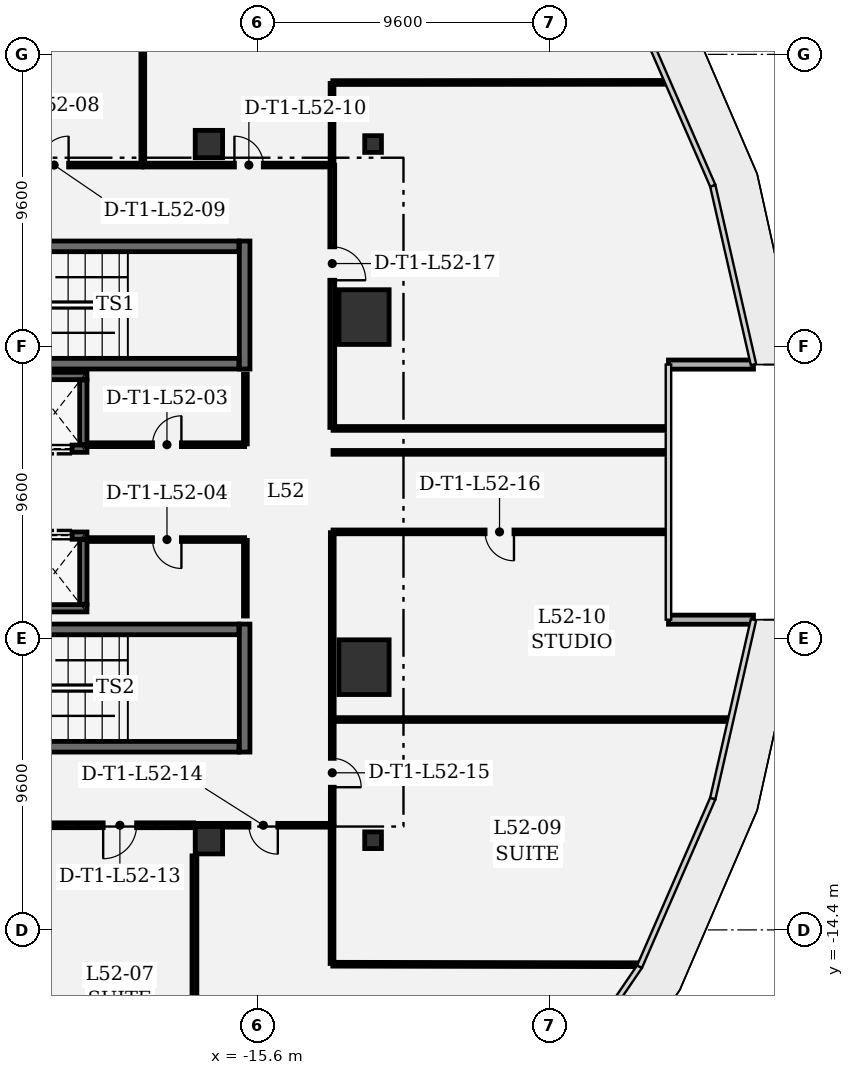
"""IFC4 building model, lengths in metres.
Left out: names, types, materials, properties, quantities, classifications, styles, units other than length and angle.
Written with IfcOpenShell. Run it as: python <this file> out.ifc"""

import sys

from ifc_helpers import new_model, si_unit, direction, frame, frame_2d, origin, origin_2d, place, context, subcontext, project, spatial, rectangle, extrude, element, fill, save


model = new_model("IFC4")
c1 = context("Model", 3, precision=1e-05, world=origin(), true_north=direction((0.0, 1.0)))
c2 = subcontext(c1, "Body", "Model", "MODEL_VIEW")
j1 = project(units=[si_unit("LENGTHUNIT", "METRE"), si_unit("PLANEANGLEUNIT", "RADIAN")], contexts=[c1])
p1 = place(None, origin())
s1 = spatial("IfcSite", under=j1, at=p1, CompositionType="ELEMENT")
p2 = place(p1, origin())
s2 = spatial("IfcBuilding", under=s1, at=p2, CompositionType="ELEMENT")
p3 = place(p2, frame((0.0, 0.0, 225.3)))
s3 = spatial("IfcBuildingStorey", under=s2, at=p3, CompositionType="ELEMENT", Elevation=225.3)
for number, where, z_axis, x_axis in (
    (1, (-12.097, -5.758, 0.0), (0.0, 0.0, 1.0), (1.0, 0.0, 0.0)),
    (2, (-12.097, 5.758, 0.0), (0.0, 0.0, 1.0), (1.0, 0.0, 0.0)),
):
    element("IfcColumn", number, at=place(p3, frame(where, z_axis=z_axis, x_axis=x_axis)), inside=s3, PredefinedType="COLUMN", context=c2, shape_type="SweptSolid", body=[
        extrude(rectangle(XDim=1.65, YDim=1.8, at=origin_2d()), origin(), (0.0, 0.0, 1.0), 4.05),
    ])
for number, where, z_axis, x_axis in (
    (3, (-17.2, 11.45, 0.0), (0.0, 0.0, 1.0), (1.0, 0.0, 0.0)),
    (4, (-17.2, -11.45, 0.0), (0.0, 0.0, 1.0), (1.0, 0.0, 0.0)),
):
    element("IfcColumn", number, at=place(p3, frame(where, z_axis=z_axis, x_axis=x_axis)), inside=s3, PredefinedType="COLUMN", context=c2, shape_type="SweptSolid", body=[
        extrude(rectangle(XDim=0.9, YDim=0.9, at=origin_2d()), origin(), (0.0, 0.0, 1.0), 4.05),
    ])
for number, where, z_axis, x_axis in (
    (5, (-11.8, -11.45, 0.0), (0.0, 0.0, 1.0), (1.0, 0.0, 0.0)),
    (6, (-11.8, 11.45, 0.0), (0.0, 0.0, 1.0), (1.0, 0.0, 0.0)),
):
    element("IfcColumn", number, at=place(p3, frame(where, z_axis=z_axis, x_axis=x_axis)), inside=s3, PredefinedType="COLUMN", context=c2, shape_type="SweptSolid", body=[
        extrude(rectangle(XDim=0.55, YDim=0.55, at=origin_2d()), origin(), (0.0, 0.0, 1.0), 4.05),
    ])
for number, where, z_axis, x_axis in (
    (7, (0.713, -4.196, 0.0), (0.0, 0.0, 1.0), (-1.0, 0.0, 0.0)),
    (8, (-2.084, 4.196, 0.0), (0.0, 0.0, 1.0), (1.0, 0.0, 0.0)),
):
    element("IfcWall", number, at=place(p3, frame(where, z_axis=z_axis, x_axis=x_axis)), inside=s3, PredefinedType="SOLIDWALL", context=c2, shape_type="SweptSolid", body=[
        extrude(rectangle(XDim=2.797, YDim=0.3, at=frame_2d((1.398, 0.0))), origin(), (0.0, 0.0, 1.0), 3.78),
    ])
p4 = place(p3, frame((-16.025, 4.05, 0.0), z_axis=(0.0, 0.0, 1.0), x_axis=(0.0, 1.0, 0.0)))
e9 = element("IfcWall", 9, at=p4, inside=s3, PredefinedType="SHEAR", context=c2, shape_type="SweptSolid", body=[
    extrude(rectangle(XDim=4.21, YDim=0.35, at=frame_2d((2.105, 0.0))), origin(), (0.0, 0.0, 1.0), 3.78),
])
p5 = place(p3, frame((-24.335, 4.225, 0.0), z_axis=(0.0, 0.0, 1.0), x_axis=(1.0, 0.0, 0.0)))
e10 = element("IfcWall", 10, at=p5, inside=s3, PredefinedType="SHEAR", context=c2, shape_type="SweptSolid", body=[
    extrude(rectangle(XDim=8.12, YDim=0.35, at=frame_2d((4.06, 0.0))), origin(), (0.0, 0.0, 1.0), 3.78),
])
p6 = place(p3, frame((-16.215, 8.085, 0.0), z_axis=(0.0, 0.0, 1.0), x_axis=(-1.0, 0.0, 0.0)))
e11 = element("IfcWall", 11, at=p6, inside=s3, PredefinedType="SHEAR", context=c2, shape_type="SweptSolid", body=[
    extrude(rectangle(XDim=8.12, YDim=0.35, at=frame_2d((4.06, 0.0))), origin(), (0.0, 0.0, 1.0), 3.78),
])
p7 = place(p6, frame((6.74, 0.0, 0.0)))
e12 = element("IfcOpeningElement", 12, at=p7, cuts=e11, PredefinedType="OPENING", context=c2, shape_type="SweptSolid", body=[
    extrude(rectangle(XDim=1.1, YDim=2.2, at=frame_2d((0.55, 1.1))), frame((0.0, 0.185, 0.0), z_axis=(0.0, -1.0, 0.0), x_axis=(1.0, 0.0, 0.0)), (0.0, 0.0, 1.0), 0.37),
])
p8 = place(p3, frame((-16.025, -8.55, 0.0), z_axis=(0.0, 0.0, 1.0), x_axis=(0.0, 1.0, 0.0)))
e13 = element("IfcWall", 13, at=p8, inside=s3, PredefinedType="SHEAR", context=c2, shape_type="SweptSolid", body=[
    extrude(rectangle(XDim=4.21, YDim=0.35, at=frame_2d((2.105, 0.0))), origin(), (0.0, 0.0, 1.0), 3.78),
])
p9 = place(p3, frame((-24.335, -8.375, 0.0), z_axis=(0.0, 0.0, 1.0), x_axis=(1.0, 0.0, 0.0)))
e14 = element("IfcWall", 14, at=p9, inside=s3, PredefinedType="SHEAR", context=c2, shape_type="SweptSolid", body=[
    extrude(rectangle(XDim=8.12, YDim=0.35, at=frame_2d((4.06, 0.0))), origin(), (0.0, 0.0, 1.0), 3.78),
])
p10 = place(p9, frame((0.28, 0.0, 0.0)))
e15 = element("IfcOpeningElement", 15, at=p10, cuts=e14, PredefinedType="OPENING", context=c2, shape_type="SweptSolid", body=[
    extrude(rectangle(XDim=1.1, YDim=2.2, at=frame_2d((0.55, 1.1))), frame((0.0, 0.185, 0.0), z_axis=(0.0, -1.0, 0.0), x_axis=(1.0, 0.0, 0.0)), (0.0, 0.0, 1.0), 0.37),
])
p11 = place(p3, frame((-16.215, -4.515, 0.0), z_axis=(0.0, 0.0, 1.0), x_axis=(-1.0, 0.0, 0.0)))
e16 = element("IfcWall", 16, at=p11, inside=s3, PredefinedType="SHEAR", context=c2, shape_type="SweptSolid", body=[
    extrude(rectangle(XDim=8.12, YDim=0.35, at=frame_2d((4.06, 0.0))), origin(), (0.0, 0.0, 1.0), 3.78),
])
p12 = place(p3, frame((-21.21, 1.43, 0.0), z_axis=(0.0, 0.0, 1.0), x_axis=(-1.0, 0.0, 0.0)))
e17 = element("IfcWall", 17, at=p12, inside=s3, PredefinedType="SHEAR", context=c2, shape_type="SweptSolid", body=[
    extrude(rectangle(XDim=2.08, YDim=0.24, at=frame_2d((1.04, 0.0))), origin(), (0.0, 0.0, 1.0), 3.78),
])
p13 = place(p12, frame((0.49, 0.0, 0.0)))
e18 = element("IfcOpeningElement", 18, at=p13, cuts=e17, PredefinedType="OPENING", context=c2, shape_type="SweptSolid", body=[
    extrude(rectangle(XDim=1.1, YDim=2.2, at=frame_2d((0.55, 1.1))), frame((0.0, 0.13, 0.0), z_axis=(0.0, -1.0, 0.0), x_axis=(1.0, 0.0, 0.0)), (0.0, 0.0, 1.0), 0.26),
])
p14 = place(p3, frame((-23.29, 3.82, 0.0), z_axis=(0.0, 0.0, 1.0), x_axis=(1.0, 0.0, 0.0)))
e19 = element("IfcWall", 19, at=p14, inside=s3, PredefinedType="SHEAR", context=c2, shape_type="SweptSolid", body=[
    extrude(rectangle(XDim=2.08, YDim=0.24, at=frame_2d((1.04, 0.0))), origin(), (0.0, 0.0, 1.0), 3.78),
])
p15 = place(p3, frame((-21.33, 3.688, 0.0), z_axis=(0.0, 0.0, 1.0), x_axis=(0.0, -1.0, 0.0)))
e20 = element("IfcWall", 20, at=p15, inside=s3, PredefinedType="SHEAR", context=c2, shape_type="SweptSolid", body=[
    extrude(rectangle(XDim=2.126, YDim=0.24, at=frame_2d((1.063, 0.0))), origin(), (0.0, 0.0, 1.0), 3.78),
])
p16 = place(p3, frame((-21.21, -3.82, 0.0), z_axis=(0.0, 0.0, 1.0), x_axis=(-1.0, 0.0, 0.0)))
e21 = element("IfcWall", 21, at=p16, inside=s3, PredefinedType="SHEAR", context=c2, shape_type="SweptSolid", body=[
    extrude(rectangle(XDim=1.8, YDim=0.24, at=frame_2d((0.9, 0.0))), origin(), (0.0, 0.0, 1.0), 3.78),
])
p17 = place(p3, frame((-23.01, -1.43, 0.0), z_axis=(0.0, 0.0, 1.0), x_axis=(1.0, 0.0, 0.0)))
e22 = element("IfcWall", 22, at=p17, inside=s3, PredefinedType="SHEAR", context=c2, shape_type="SweptSolid", body=[
    extrude(rectangle(XDim=1.8, YDim=0.24, at=frame_2d((0.9, 0.0))), origin(), (0.0, 0.0, 1.0), 3.78),
])
p18 = place(p17, frame((0.21, 0.0, 0.0)))
e23 = element("IfcOpeningElement", 23, at=p18, cuts=e22, PredefinedType="OPENING", context=c2, shape_type="SweptSolid", body=[
    extrude(rectangle(XDim=1.1, YDim=2.2, at=frame_2d((0.55, 1.1))), frame((0.0, 0.13, 0.0), z_axis=(0.0, -1.0, 0.0), x_axis=(1.0, 0.0, 0.0)), (0.0, 0.0, 1.0), 0.26),
])
p19 = place(p3, frame((-21.33, -1.562, 0.0), z_axis=(0.0, 0.0, 1.0), x_axis=(0.0, -1.0, 0.0)))
e24 = element("IfcWall", 24, at=p19, inside=s3, PredefinedType="SHEAR", context=c2, shape_type="SweptSolid", body=[
    extrude(rectangle(XDim=2.126, YDim=0.24, at=frame_2d((1.063, 0.0))), origin(), (0.0, 0.0, 1.0), 3.78),
])
p20 = place(p3, frame((-21.134, 1.56, 0.0), z_axis=(0.0, 0.0, 1.0), x_axis=(1.0, 0.0, 0.0)))
e25 = element("IfcWall", 25, at=p20, inside=s3, PredefinedType="PARTITIONING", context=c2, shape_type="SweptSolid", body=[
    extrude(rectangle(XDim=5.109, YDim=0.125, at=frame_2d((2.554, 0.0))), origin(), (0.0, 0.0, 1.0), 3.78),
])
p21 = place(p20, frame((2.079, 0.0, 0.0)))
e26 = element("IfcOpeningElement", 26, at=p21, cuts=e25, PredefinedType="OPENING", context=c2, shape_type="SweptSolid", body=[
    extrude(rectangle(XDim=0.95, YDim=2.15, at=frame_2d((0.475, 1.075))), frame((0.0, 0.073, 0.0), z_axis=(0.0, -1.0, 0.0), x_axis=(1.0, 0.0, 0.0)), (0.0, 0.0, 1.0), 0.145),
])
p22 = place(p3, frame((-16.0, 1.585, 0.0), z_axis=(0.0, 0.0, 1.0), x_axis=(0.0, 1.0, 0.0)))
e27 = element("IfcWall", 27, at=p22, inside=s3, PredefinedType="PARTITIONING", context=c2, shape_type="SweptSolid", body=[
    extrude(rectangle(XDim=2.302, YDim=0.125, at=frame_2d((1.151, 0.0))), origin(), (0.0, 0.0, 1.0), 3.78),
])
p23 = place(p3, frame((-16.0, -4.075, 0.0), z_axis=(0.0, 0.0, 1.0), x_axis=(0.0, 1.0, 0.0)))
e28 = element("IfcWall", 28, at=p23, inside=s3, PredefinedType="PARTITIONING", context=c2, shape_type="SweptSolid", body=[
    extrude(rectangle(XDim=2.49, YDim=0.125, at=frame_2d((1.245, 0.0))), origin(), (0.0, 0.0, 1.0), 3.78),
])
p24 = place(p3, frame((-16.025, -1.56, 0.0), z_axis=(0.0, 0.0, 1.0), x_axis=(-1.0, 0.0, 0.0)))
e29 = element("IfcWall", 29, at=p24, inside=s3, PredefinedType="PARTITIONING", context=c2, shape_type="SweptSolid", body=[
    extrude(rectangle(XDim=5.109, YDim=0.125, at=frame_2d((2.554, 0.0))), origin(), (0.0, 0.0, 1.0), 3.78),
])
p25 = place(p24, frame((2.079, 0.0, 0.0)))
e30 = element("IfcOpeningElement", 30, at=p25, cuts=e29, PredefinedType="OPENING", context=c2, shape_type="SweptSolid", body=[
    extrude(rectangle(XDim=0.95, YDim=2.15, at=frame_2d((0.475, 1.075))), frame((0.0, 0.073, 0.0), z_axis=(0.0, -1.0, 0.0), x_axis=(1.0, 0.0, 0.0)), (0.0, 0.0, 1.0), 0.145),
])
p26 = place(p3, frame((-25.18, 10.758, 0.0), z_axis=(0.0, 0.0, 1.0), x_axis=(1.0, 0.0, 0.0)))
e31 = element("IfcWall", 31, at=p26, inside=s3, PredefinedType="PARTITIONING", context=c2, shape_type="SweptSolid", body=[
    extrude(rectangle(XDim=5.781, YDim=0.125, at=frame_2d((2.89, 0.0))), origin(), (0.0, 0.0, 1.0), 3.78),
])
p27 = place(p26, frame((2.415, 0.0, 0.0)))
e32 = element("IfcOpeningElement", 32, at=p27, cuts=e31, PredefinedType="OPENING", context=c2, shape_type="SweptSolid", body=[
    extrude(rectangle(XDim=0.95, YDim=2.15, at=frame_2d((0.475, 1.075))), frame((0.0, 0.073, 0.0), z_axis=(0.0, -1.0, 0.0), x_axis=(1.0, 0.0, 0.0)), (0.0, 0.0, 1.0), 0.145),
])
p28 = place(p3, frame((-19.374, 10.783, 0.0), z_axis=(0.0, 0.0, 1.0), x_axis=(0.0, 1.0, 0.0)))
e33 = element("IfcWall", 33, at=p28, inside=s3, PredefinedType="PARTITIONING", context=c2, shape_type="SweptSolid", body=[
    extrude(rectangle(XDim=14.442, YDim=0.125, at=frame_2d((7.221, 0.0))), origin(), (0.0, 0.0, 1.0), 2.977),
])
p29 = place(p3, frame((-19.341, 10.758, 0.0), z_axis=(0.0, 0.0, 1.0), x_axis=(1.0, 0.0, 0.0)))
e34 = element("IfcWall", 34, at=p29, inside=s3, PredefinedType="PARTITIONING", context=c2, shape_type="SweptSolid", body=[
    extrude(rectangle(XDim=6.166, YDim=0.125, at=frame_2d((3.083, 0.0))), origin(), (0.0, 0.0, 1.0), 3.344),
])
p30 = place(p29, frame((2.981, 0.0, 0.0)))
e35 = element("IfcOpeningElement", 35, at=p30, cuts=e34, PredefinedType="OPENING", context=c2, shape_type="SweptSolid", body=[
    extrude(rectangle(XDim=0.95, YDim=2.15, at=frame_2d((0.475, 1.075))), frame((0.0, 0.073, 0.0), z_axis=(0.0, -1.0, 0.0), x_axis=(1.0, 0.0, 0.0)), (0.0, 0.0, 1.0), 0.145),
])
p31 = place(p3, frame((-13.15, 13.447, 0.0), z_axis=(0.0, 0.0, 1.0), x_axis=(0.0, -1.0, 0.0)))
e36 = element("IfcWall", 36, at=p31, inside=s3, PredefinedType="PARTITIONING", context=c2, shape_type="SweptSolid", body=[
    extrude(rectangle(XDim=2.664, YDim=0.125, at=frame_2d((1.332, 0.0))), origin(), (0.0, 0.0, 1.0), 3.78),
])
p32 = place(p3, frame((-13.125, 13.472, 0.0), z_axis=(0.0, 0.0, 1.0), x_axis=(0.999999760561, 0.00069201046, 0.0)))
e37 = element("IfcWall", 37, at=p32, inside=s3, PredefinedType="PARTITIONING", context=c2, shape_type="SweptSolid", body=[
    extrude(rectangle(XDim=10.937, YDim=0.125, at=frame_2d((5.468, 0.0))), origin(), (0.0, 0.0, 1.0), 3.78),
])
p33 = place(p3, frame((-17.676, -20.662, 0.0), z_axis=(0.0, 0.0, 1.0), x_axis=(0.0, 1.0, 0.0)))
e38 = element("IfcWall", 38, at=p33, inside=s3, PredefinedType="PARTITIONING", context=c2, shape_type="SweptSolid", body=[
    extrude(rectangle(XDim=8.697, YDim=0.16, at=frame_2d((4.349, 0.0))), origin(), (0.0, 0.0, 1.0), 2.977),
])
p34 = place(p3, frame((-17.701, -10.958, 0.0), z_axis=(0.0, 0.0, 1.0), x_axis=(-1.0, 0.0, 0.0)))
e39 = element("IfcWall", 39, at=p34, inside=s3, PredefinedType="PARTITIONING", context=c2, shape_type="SweptSolid", body=[
    extrude(rectangle(XDim=4.853, YDim=0.16, at=frame_2d((2.427, 0.0))), origin(), (0.0, 0.0, 1.0), 3.344),
])
p35 = place(p34, frame((1.877, 0.0, 0.0)))
e40 = element("IfcOpeningElement", 40, at=p35, cuts=e39, PredefinedType="OPENING", context=c2, shape_type="SweptSolid", body=[
    extrude(rectangle(XDim=1.1, YDim=2.15, at=frame_2d((0.55, 1.075))), frame((0.0, 0.09, 0.0), z_axis=(0.0, -1.0, 0.0), x_axis=(1.0, 0.0, 0.0)), (0.0, 0.0, 1.0), 0.18),
])
p36 = place(p3, frame((-3.088, -15.545, 0.0), z_axis=(0.0, 0.0, 1.0), x_axis=(-0.999998671921, 0.001629771613, 0.0)))
e41 = element("IfcWall", 41, at=p36, inside=s3, PredefinedType="PARTITIONING", context=c2, shape_type="SweptSolid", body=[
    extrude(rectangle(XDim=10.037, YDim=0.125, at=frame_2d((5.018, 0.0))), origin(), (0.0, 0.0, 1.0), 3.78),
])
p37 = place(p3, frame((-13.15, -10.983, 0.0), z_axis=(0.0, 0.0, 1.0), x_axis=(0.0, -1.0, 0.0)))
e42 = element("IfcWall", 42, at=p37, inside=s3, PredefinedType="PARTITIONING", context=c2, shape_type="SweptSolid", body=[
    extrude(rectangle(XDim=4.521, YDim=0.125, at=frame_2d((2.26, 0.0))), origin(), (0.0, 0.0, 1.0), 3.78),
])
p38 = place(p3, frame((-13.175, -10.958, 0.0), z_axis=(0.0, 0.0, 1.0), x_axis=(-1.0, 0.0, 0.0)))
e43 = element("IfcWall", 43, at=p38, inside=s3, PredefinedType="PARTITIONING", context=c2, shape_type="SweptSolid", body=[
    extrude(rectangle(XDim=4.468, YDim=0.125, at=frame_2d((2.234, 0.0))), origin(), (0.0, 0.0, 1.0), 3.344),
])
p39 = place(p38, frame((1.759, 0.0, 0.0)))
e44 = element("IfcOpeningElement", 44, at=p39, cuts=e43, PredefinedType="OPENING", context=c2, shape_type="SweptSolid", body=[
    extrude(rectangle(XDim=0.95, YDim=2.15, at=frame_2d((0.475, 1.075))), frame((0.0, 0.073, 0.0), z_axis=(0.0, -1.0, 0.0), x_axis=(1.0, 0.0, 0.0)), (0.0, 0.0, 1.0), 0.145),
])
p40 = place(p3, frame((-0.115, -7.481, 0.0), z_axis=(0.0, 0.0, 1.0), x_axis=(-1.0, 0.0, 0.0)))
e45 = element("IfcWall", 45, at=p40, inside=s3, PredefinedType="PARTITIONING", context=c2, shape_type="SweptSolid", body=[
    extrude(rectangle(XDim=13.002, YDim=0.125, at=frame_2d((6.501, 0.0))), origin(), (0.0, 0.0, 1.0), 3.78),
])
p41 = place(p3, frame((-13.142, -7.506, 0.0), z_axis=(0.0, 0.0, 1.0), x_axis=(0.0, -1.0, 0.0)))
e46 = element("IfcWall", 46, at=p41, inside=s3, PredefinedType="PARTITIONING", context=c2, shape_type="SweptSolid", body=[
    extrude(rectangle(XDim=3.452, YDim=0.125, at=frame_2d((1.726, 0.0))), origin(), (0.0, 0.0, 1.0), 3.0),
])
p42 = place(p41, frame((1.251, 0.0, 0.0)))
e47 = element("IfcOpeningElement", 47, at=p42, cuts=e46, PredefinedType="OPENING", context=c2, shape_type="SweptSolid", body=[
    extrude(rectangle(XDim=0.95, YDim=2.15, at=frame_2d((0.475, 1.075))), frame((0.0, 0.073, 0.0), z_axis=(0.0, -1.0, 0.0), x_axis=(1.0, 0.0, 0.0)), (0.0, 0.0, 1.0), 0.145),
])
for number, where, z_axis, x_axis in (
    (48, (-2.165, 2.095, 0.0), (0.0, 0.0, 1.0), (-1.0, 0.0, 0.0)),
    (49, (-2.165, 1.308, 0.0), (0.0, 0.0, 1.0), (-1.0, 0.0, 0.0)),
):
    element("IfcWall", number, at=place(p3, frame(where, z_axis=z_axis, x_axis=x_axis)), inside=s3, PredefinedType="PARTITIONING", context=c2, shape_type="SweptSolid", body=[
        extrude(rectangle(XDim=10.953, YDim=0.125, at=frame_2d((5.476, 0.0))), origin(), (0.0, 0.0, 1.0), 3.78),
    ])
p43 = place(p3, frame((-2.165, -1.308, 0.0), z_axis=(0.0, 0.0, 1.0), x_axis=(-1.0, 0.0, 0.0)))
e50 = element("IfcWall", 50, at=p43, inside=s3, PredefinedType="PARTITIONING", context=c2, shape_type="SweptSolid", body=[
    extrude(rectangle(XDim=10.953, YDim=0.125, at=frame_2d((5.476, 0.0))), origin(), (0.0, 0.0, 1.0), 3.78),
])
p44 = place(p43, frame((5.001, 0.0, 0.0)))
e51 = element("IfcOpeningElement", 51, at=p44, cuts=e50, PredefinedType="OPENING", context=c2, shape_type="SweptSolid", body=[
    extrude(rectangle(XDim=0.95, YDim=2.15, at=frame_2d((0.475, 1.075))), frame((0.0, 0.073, 0.0), z_axis=(0.0, -1.0, 0.0), x_axis=(1.0, 0.0, 0.0)), (0.0, 0.0, 1.0), 0.145),
])
p45 = place(p3, frame((-13.142, -1.333, 0.0), z_axis=(0.0, 0.0, 1.0), x_axis=(0.0, -1.0, 0.0)))
e52 = element("IfcWall", 52, at=p45, inside=s3, PredefinedType="PARTITIONING", context=c2, shape_type="SweptSolid", body=[
    extrude(rectangle(XDim=6.115, YDim=0.125, at=frame_2d((3.058, 0.0))), origin(), (0.0, 0.0, 1.0), 3.78),
])
p46 = place(p3, frame((-13.142, 10.758, 0.0), z_axis=(0.0, 0.0, 1.0), x_axis=(0.0, -1.0, 0.0)))
e53 = element("IfcWall", 53, at=p46, inside=s3, PredefinedType="PARTITIONING", context=c2, shape_type="SweptSolid", body=[
    extrude(rectangle(XDim=8.63, YDim=0.16, at=frame_2d((4.315, 0.0))), origin(), (0.0, 0.0, 1.0), 3.0),
])
p47 = place(p46, frame((2.689, 0.0, 0.0)))
e54 = element("IfcOpeningElement", 54, at=p47, cuts=e53, PredefinedType="OPENING", context=c2, shape_type="SweptSolid", body=[
    extrude(rectangle(XDim=1.1, YDim=2.15, at=frame_2d((0.55, 1.075))), frame((0.0, 0.09, 0.0), z_axis=(0.0, -1.0, 0.0), x_axis=(1.0, 0.0, 0.0)), (0.0, 0.0, 1.0), 0.18),
])
p48 = place(p13, origin())
e55 = element("IfcDoor", 55, at=p48, inside=s3, OperationType="DOUBLE_DOOR_SLIDING", PredefinedType="DOOR", context=c2, shape_type="SweptSolid", body=[
    extrude(rectangle(XDim=1.1, YDim=2.2, at=frame_2d((0.55, 1.1))), frame((0.0, 0.025, 0.0), z_axis=(0.0, -1.0, 0.0), x_axis=(1.0, 0.0, 0.0)), (0.0, 0.0, 1.0), 0.05),
])
fill(e18, e55)
p49 = place(p18, origin())
e56 = element("IfcDoor", 56, at=p49, inside=s3, OperationType="DOUBLE_DOOR_SLIDING", PredefinedType="DOOR", context=c2, shape_type="SweptSolid", body=[
    extrude(rectangle(XDim=1.1, YDim=2.2, at=frame_2d((0.55, 1.1))), frame((0.0, 0.025, 0.0), z_axis=(0.0, -1.0, 0.0), x_axis=(1.0, 0.0, 0.0)), (0.0, 0.0, 1.0), 0.05),
])
fill(e23, e56)
p50 = place(p21, origin())
e57 = element("IfcDoor", 57, at=p50, inside=s3, OperationType="SINGLE_SWING_RIGHT", PredefinedType="DOOR", context=c2, shape_type="SweptSolid", body=[
    extrude(rectangle(XDim=0.95, YDim=2.15, at=frame_2d((0.475, 1.075))), frame((0.0, 0.025, 0.0), z_axis=(0.0, -1.0, 0.0), x_axis=(1.0, 0.0, 0.0)), (0.0, 0.0, 1.0), 0.05),
])
fill(e26, e57)
p51 = place(p25, origin())
e58 = element("IfcDoor", 58, at=p51, inside=s3, OperationType="SINGLE_SWING_LEFT", PredefinedType="DOOR", context=c2, shape_type="SweptSolid", body=[
    extrude(rectangle(XDim=0.95, YDim=2.15, at=frame_2d((0.475, 1.075))), frame((0.0, 0.025, 0.0), z_axis=(0.0, -1.0, 0.0), x_axis=(1.0, 0.0, 0.0)), (0.0, 0.0, 1.0), 0.05),
])
fill(e30, e58)
p52 = place(p27, origin())
e59 = element("IfcDoor", 59, at=p52, inside=s3, OperationType="SINGLE_SWING_RIGHT", PredefinedType="DOOR", context=c2, shape_type="SweptSolid", body=[
    extrude(rectangle(XDim=0.95, YDim=2.15, at=frame_2d((0.475, 1.075))), frame((0.0, 0.025, 0.0), z_axis=(0.0, -1.0, 0.0), x_axis=(1.0, 0.0, 0.0)), (0.0, 0.0, 1.0), 0.05),
])
fill(e32, e59)
p53 = place(p30, origin())
e60 = element("IfcDoor", 60, at=p53, inside=s3, OperationType="SINGLE_SWING_LEFT", PredefinedType="DOOR", context=c2, shape_type="SweptSolid", body=[
    extrude(rectangle(XDim=0.95, YDim=2.15, at=frame_2d((0.475, 1.075))), frame((0.0, 0.025, 0.0), z_axis=(0.0, -1.0, 0.0), x_axis=(1.0, 0.0, 0.0)), (0.0, 0.0, 1.0), 0.05),
])
fill(e35, e60)
p54 = place(p35, origin())
e61 = element("IfcDoor", 61, at=p54, inside=s3, OperationType="SINGLE_SWING_RIGHT", PredefinedType="DOOR", context=c2, shape_type="SweptSolid", body=[
    extrude(rectangle(XDim=1.1, YDim=2.15, at=frame_2d((0.55, 1.075))), frame((0.0, 0.025, 0.0), z_axis=(0.0, -1.0, 0.0), x_axis=(1.0, 0.0, 0.0)), (0.0, 0.0, 1.0), 0.05),
])
fill(e40, e61)
p55 = place(p39, origin())
e62 = element("IfcDoor", 62, at=p55, inside=s3, OperationType="SINGLE_SWING_LEFT", PredefinedType="DOOR", context=c2, shape_type="SweptSolid", body=[
    extrude(rectangle(XDim=0.95, YDim=2.15, at=frame_2d((0.475, 1.075))), frame((0.0, 0.025, 0.0), z_axis=(0.0, -1.0, 0.0), x_axis=(1.0, 0.0, 0.0)), (0.0, 0.0, 1.0), 0.05),
])
fill(e44, e62)
p56 = place(p42, origin())
e63 = element("IfcDoor", 63, at=p56, inside=s3, OperationType="SINGLE_SWING_RIGHT", PredefinedType="DOOR", context=c2, shape_type="SweptSolid", body=[
    extrude(rectangle(XDim=0.95, YDim=2.15, at=frame_2d((0.475, 1.075))), frame((0.0, 0.025, 0.0), z_axis=(0.0, -1.0, 0.0), x_axis=(1.0, 0.0, 0.0)), (0.0, 0.0, 1.0), 0.05),
])
fill(e47, e63)
p57 = place(p44, origin())
e64 = element("IfcDoor", 64, at=p57, inside=s3, OperationType="SINGLE_SWING_LEFT", PredefinedType="DOOR", context=c2, shape_type="SweptSolid", body=[
    extrude(rectangle(XDim=0.95, YDim=2.15, at=frame_2d((0.475, 1.075))), frame((0.0, 0.025, 0.0), z_axis=(0.0, -1.0, 0.0), x_axis=(1.0, 0.0, 0.0)), (0.0, 0.0, 1.0), 0.05),
])
fill(e51, e64)
p58 = place(p47, origin())
e65 = element("IfcDoor", 65, at=p58, inside=s3, OperationType="SINGLE_SWING_RIGHT", PredefinedType="DOOR", context=c2, shape_type="SweptSolid", body=[
    extrude(rectangle(XDim=1.1, YDim=2.15, at=frame_2d((0.55, 1.075))), frame((0.0, 0.025, 0.0), z_axis=(0.0, -1.0, 0.0), x_axis=(1.0, 0.0, 0.0)), (0.0, 0.0, 1.0), 0.05),
])
fill(e54, e65)
save(model, sys.argv[1])
